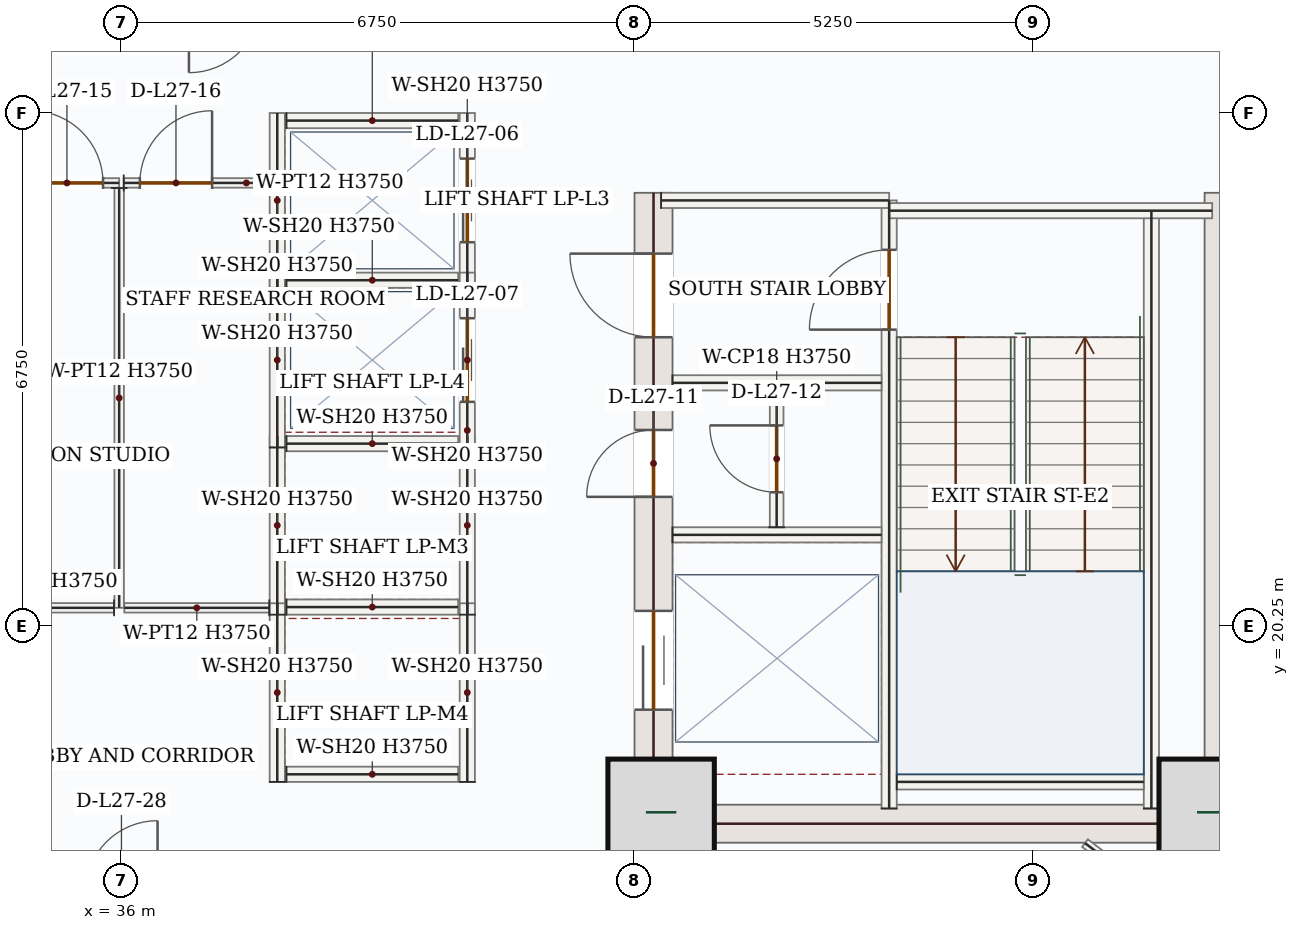
"""IFC4 building model, lengths in metres.
Left out: names, types, materials, properties, quantities, classifications, styles, units other than length and angle.
Written with IfcOpenShell. Run it as: python <this file> out.ifc"""

import sys

from ifc_helpers import new_model, si_unit, direction, frame, frame_2d, origin, origin_2d, place, context, subcontext, project, spatial, rectangle, extrude, source, transform, mapped, element, fill, save


model = new_model("IFC4")
c1 = context("Model", 3, precision=1e-05, world=origin(), true_north=direction((0.0, 1.0)))
c2 = subcontext(c1, "Body", "Model", "MODEL_VIEW")
j1 = project(units=[si_unit("LENGTHUNIT", "METRE"), si_unit("PLANEANGLEUNIT", "RADIAN")], contexts=[c1])
p1 = place(None, origin())
s1 = spatial("IfcSite", under=j1, at=p1, CompositionType="ELEMENT")
p2 = place(p1, origin())
s2 = spatial("IfcBuilding", under=s1, at=p2, CompositionType="ELEMENT")
p3 = place(p2, frame((0.0, 0.0, 121.5)))
s3 = spatial("IfcBuildingStorey", under=s2, at=p3, CompositionType="ELEMENT", Elevation=121.5)
p4 = place(p3, frame((43.0, 17.4, 0.0), z_axis=(0.0, 0.0, 1.0), x_axis=(0.0, 1.0, 0.0)))
e1 = element("IfcWall", 1, at=p4, inside=s3, PredefinedType="SHEAR", context=c2, shape_type="SweptSolid", body=[
    extrude(rectangle(XDim=8.55, YDim=0.5, at=frame_2d((4.275, 0.0))), origin(), (0.0, 0.0, 1.0), 3.75),
])
p5 = place(p4, frame((6.65, 0.0, 0.0)))
e2 = element("IfcOpeningElement", 2, at=p5, cuts=e1, PredefinedType="OPENING", context=c2, shape_type="SweptSolid", body=[
    extrude(rectangle(XDim=1.1, YDim=2.2, at=frame_2d((0.55, 1.1))), frame((0.0, 0.26, 0.0), z_axis=(0.0, -1.0, 0.0), x_axis=(1.0, 0.0, 0.0)), (0.0, 0.0, 1.0), 0.52),
])
p6 = place(p4, frame((1.75, 0.0, 0.0)))
e3 = element("IfcOpeningElement", 3, at=p6, cuts=e1, PredefinedType="OPENING", context=c2, shape_type="SweptSolid", body=[
    extrude(rectangle(XDim=1.3, YDim=2.2, at=frame_2d((0.65, 1.1))), frame((0.0, 0.26, 0.0), z_axis=(0.0, -1.0, 0.0), x_axis=(1.0, 0.0, 0.0)), (0.0, 0.0, 1.0), 0.52),
])
p7 = place(p4, frame((4.55, 0.0, 0.0)))
e4 = element("IfcOpeningElement", 4, at=p7, cuts=e1, PredefinedType="OPENING", context=c2, shape_type="SweptSolid", body=[
    extrude(rectangle(XDim=0.88, YDim=2.1, at=frame_2d((0.44, 1.05))), frame((0.0, 0.26, 0.0), z_axis=(0.0, -1.0, 0.0), x_axis=(1.0, 0.0, 0.0)), (0.0, 0.0, 1.0), 0.52),
])
m1 = source(origin(), c2, "Body", "SweptSolid", [
    extrude(rectangle(XDim=8.55, YDim=0.5, at=frame_2d((4.275, 0.0))), origin(), (0.0, 0.0, 1.0), 3.75),
])
p8 = place(p3, frame((50.5, 17.4, 0.0), z_axis=(0.0, 0.0, 1.0), x_axis=(0.0, 1.0, 0.0)))
e5 = element("IfcWall", 5, at=p8, inside=s3, PredefinedType="SHEAR", context=c2, shape_type="MappedRepresentation", body=[
    mapped(m1, transform((0.0, 0.0, 0.0), x_axis=(1.0, 0.0, 0.0), y_axis=(0.0, 1.0, 0.0), z_axis=(0.0, 0.0, 1.0), scale=1.0)),
])
m2 = source(origin(), c2, "Body", "SweptSolid", [
    extrude(rectangle(XDim=7.0, YDim=0.5, at=frame_2d((3.5, 0.0))), origin(), (0.0, 0.0, 1.0), 3.75),
])
p9 = place(p3, frame((43.25, 17.65, 0.0), z_axis=(0.0, 0.0, 1.0), x_axis=(1.0, 0.0, 0.0)))
e6 = element("IfcWall", 6, at=p9, inside=s3, PredefinedType="SHEAR", context=c2, shape_type="MappedRepresentation", body=[
    mapped(m2, transform((0.0, 0.0, 0.0), x_axis=(1.0, 0.0, 0.0), y_axis=(0.0, 1.0, 0.0), z_axis=(0.0, 0.0, 1.0), scale=1.0)),
])
m3 = source(origin(), c2, "Body", "SweptSolid", [
    extrude(rectangle(XDim=1.4, YDim=1.4, at=origin_2d()), origin(), (0.0, 0.0, 1.0), 4.2),
])
for number, where, z_axis, x_axis in (
    (7, (43.1, 17.8, 0.0), (0.0, 0.0, 1.0), (1.0, 0.0, 0.0)),
    (8, (50.35, 17.8, 0.0), (0.0, 0.0, 1.0), (1.0, 0.0, 0.0)),
):
    element("IfcColumn", number, at=place(p3, frame(where, z_axis=z_axis, x_axis=x_axis)), inside=s3, PredefinedType="COLUMN", context=c2, shape_type="MappedRepresentation", body=[
        mapped(m3, transform((0.0, 0.0, 0.0), x_axis=(1.0, 0.0, 0.0), y_axis=(0.0, 1.0, 0.0), z_axis=(0.0, 0.0, 1.0), scale=1.0)),
    ])
m4 = source(origin(), c2, "Body", "SweptSolid", [
    extrude(rectangle(XDim=5.258, YDim=0.32, at=frame_2d((2.629, 0.0))), origin(), (0.0, 0.0, 1.0), 3.75),
])
p10 = place(p3, frame((53.06, 18.458, 0.0), z_axis=(0.0, 0.0, 1.0), x_axis=(-0.707106781187, -0.707106781187, 0.0)))
e9 = element("IfcWall", 9, at=p10, inside=s3, PredefinedType="SOLIDWALL", context=c2, shape_type="MappedRepresentation", body=[
    mapped(m4, transform((0.0, 0.0, 0.0), x_axis=(1.0, 0.0, 0.0), y_axis=(0.0, 1.0, 0.0), z_axis=(0.0, 0.0, 1.0), scale=1.0)),
])
m5 = source(origin(), c2, "Body", "SweptSolid", [
    extrude(rectangle(XDim=7.87, YDim=0.2, at=frame_2d((3.935, 0.0))), origin(), (0.0, 0.0, 1.0), 3.75),
])
p11 = place(p3, frame((49.55, 17.85, 0.0), z_axis=(0.0, 0.0, 1.0), x_axis=(0.0, 1.0, 0.0)))
e10 = element("IfcWall", 10, at=p11, inside=s3, PredefinedType="SOLIDWALL", context=c2, shape_type="MappedRepresentation", body=[
    mapped(m5, transform((0.0, 0.0, 0.0), x_axis=(1.0, 0.0, 0.0), y_axis=(0.0, 1.0, 0.0), z_axis=(0.0, 0.0, 1.0), scale=1.0)),
])
p12 = place(p3, frame((46.1, 17.85, 0.0), z_axis=(0.0, 0.0, 1.0), x_axis=(0.0, 1.0, 0.0)))
e11 = element("IfcWall", 11, at=p12, inside=s3, PredefinedType="SOLIDWALL", context=c2, shape_type="SweptSolid", body=[
    extrude(rectangle(XDim=8.0, YDim=0.2, at=frame_2d((4.0, 0.0))), origin(), (0.0, 0.0, 1.0), 3.75),
])
p13 = place(p12, frame((6.3, 0.0, 0.0)))
e12 = element("IfcOpeningElement", 12, at=p13, cuts=e11, PredefinedType="OPENING", context=c2, shape_type="SweptSolid", body=[
    extrude(rectangle(XDim=1.05, YDim=2.15, at=frame_2d((0.525, 1.075))), frame((0.0, 0.11, 0.0), z_axis=(0.0, -1.0, 0.0), x_axis=(1.0, 0.0, 0.0)), (0.0, 0.0, 1.0), 0.22),
])
m6 = source(origin(), c2, "Body", "SweptSolid", [
    extrude(rectangle(XDim=3.0, YDim=0.2, at=frame_2d((1.5, 0.0))), origin(), (0.0, 0.0, 1.0), 3.75),
])
p14 = place(p3, frame((43.1, 25.85, 0.0), z_axis=(0.0, 0.0, 1.0), x_axis=(1.0, 0.0, 0.0)))
e13 = element("IfcWall", 13, at=p14, inside=s3, PredefinedType="SOLIDWALL", context=c2, shape_type="MappedRepresentation", body=[
    mapped(m6, transform((0.0, 0.0, 0.0), x_axis=(1.0, 0.0, 0.0), y_axis=(0.0, 1.0, 0.0), z_axis=(0.0, 0.0, 1.0), scale=1.0)),
])
m7 = source(origin(), c2, "Body", "SweptSolid", [
    extrude(rectangle(XDim=4.25, YDim=0.2, at=frame_2d((2.125, 0.0))), origin(), (0.0, 0.0, 1.0), 3.75),
])
p15 = place(p3, frame((46.1, 25.715, 0.0), z_axis=(0.0, 0.0, 1.0), x_axis=(1.0, 0.0, 0.0)))
e14 = element("IfcWall", 14, at=p15, inside=s3, PredefinedType="SOLIDWALL", context=c2, shape_type="MappedRepresentation", body=[
    mapped(m7, transform((0.0, 0.0, 0.0), x_axis=(1.0, 0.0, 0.0), y_axis=(0.0, 1.0, 0.0), z_axis=(0.0, 0.0, 1.0), scale=1.0)),
])
m8 = source(origin(), c2, "Body", "SweptSolid", [
    extrude(rectangle(XDim=3.25, YDim=0.2, at=frame_2d((1.625, 0.0))), origin(), (0.0, 0.0, 1.0), 3.75),
])
p16 = place(p3, frame((46.2, 18.2, 0.0), z_axis=(0.0, 0.0, 1.0), x_axis=(1.0, 0.0, 0.0)))
e15 = element("IfcWall", 15, at=p16, inside=s3, PredefinedType="SOLIDWALL", context=c2, shape_type="MappedRepresentation", body=[
    mapped(m8, transform((0.0, 0.0, 0.0), x_axis=(1.0, 0.0, 0.0), y_axis=(0.0, 1.0, 0.0), z_axis=(0.0, 0.0, 1.0), scale=1.0)),
])
m9 = source(origin(), c2, "Body", "SweptSolid", [
    extrude(rectangle(XDim=2.75, YDim=0.2, at=frame_2d((1.375, 0.0))), origin(), (0.0, 0.0, 1.0), 3.75),
])
for number, where, z_axis, x_axis in (
    (16, (43.25, 23.45, 0.0), (0.0, 0.0, 1.0), (1.0, 0.0, 0.0)),
    (17, (43.25, 21.45, 0.0), (0.0, 0.0, 1.0), (1.0, 0.0, 0.0)),
):
    element("IfcWall", number, at=place(p3, frame(where, z_axis=z_axis, x_axis=x_axis)), inside=s3, PredefinedType="SOLIDWALL", context=c2, shape_type="MappedRepresentation", body=[
        mapped(m9, transform((0.0, 0.0, 0.0), x_axis=(1.0, 0.0, 0.0), y_axis=(0.0, 1.0, 0.0), z_axis=(0.0, 0.0, 1.0), scale=1.0)),
    ])
p17 = place(p3, frame((44.62, 21.55, 0.0), z_axis=(0.0, 0.0, 1.0), x_axis=(0.0, 1.0, 0.0)))
e18 = element("IfcWall", 18, at=p17, inside=s3, PredefinedType="PARTITIONING", context=c2, shape_type="SweptSolid", body=[
    extrude(rectangle(XDim=1.8, YDim=0.18, at=frame_2d((0.9, 0.0))), origin(), (0.0, 0.0, 1.0), 3.75),
])
p18 = place(p17, frame((0.46, 0.0, 0.0)))
e19 = element("IfcOpeningElement", 19, at=p18, cuts=e18, PredefinedType="OPENING", context=c2, shape_type="SweptSolid", body=[
    extrude(rectangle(XDim=0.88, YDim=2.1, at=frame_2d((0.44, 1.05))), frame((0.0, 0.1, 0.0), z_axis=(0.0, -1.0, 0.0), x_axis=(1.0, 0.0, 0.0)), (0.0, 0.0, 1.0), 0.2),
])
m10 = source(origin(), c2, "Body", "SweptSolid", [
    extrude(rectangle(XDim=2.35, YDim=0.2, at=frame_2d((1.175, 0.0))), origin(), (0.0, 0.0, 1.0), 3.75),
])
for number, where, z_axis, x_axis in (
    (20, (38.05, 20.4, 0.0), (0.0, 0.0, 1.0), (0.0, 1.0, 0.0)),
    (21, (40.55, 20.4, 0.0), (0.0, 0.0, 1.0), (0.0, 1.0, 0.0)),
):
    element("IfcWall", number, at=place(p3, frame(where, z_axis=z_axis, x_axis=x_axis)), inside=s3, PredefinedType="SOLIDWALL", context=c2, shape_type="MappedRepresentation", body=[
        mapped(m10, transform((0.0, 0.0, 0.0), x_axis=(1.0, 0.0, 0.0), y_axis=(0.0, 1.0, 0.0), z_axis=(0.0, 0.0, 1.0), scale=1.0)),
    ])
m11 = source(origin(), c2, "Body", "SweptSolid", [
    extrude(rectangle(XDim=2.26, YDim=0.2, at=frame_2d((1.13, 0.0))), origin(), (0.0, 0.0, 1.0), 3.75),
])
for number, where, z_axis, x_axis in (
    (22, (38.17, 20.5, 0.0), (0.0, 0.0, 1.0), (1.0, 0.0, 0.0)),
    (23, (38.17, 22.65, 0.0), (0.0, 0.0, 1.0), (1.0, 0.0, 0.0)),
):
    element("IfcWall", number, at=place(p3, frame(where, z_axis=z_axis, x_axis=x_axis)), inside=s3, PredefinedType="SOLIDWALL", context=c2, shape_type="MappedRepresentation", body=[
        mapped(m11, transform((0.0, 0.0, 0.0), x_axis=(1.0, 0.0, 0.0), y_axis=(0.0, 1.0, 0.0), z_axis=(0.0, 0.0, 1.0), scale=1.0)),
    ])
for number, where, z_axis, x_axis in (
    (24, (38.05, 18.2, 0.0), (0.0, 0.0, 1.0), (0.0, 1.0, 0.0)),
    (25, (40.55, 18.2, 0.0), (0.0, 0.0, 1.0), (0.0, 1.0, 0.0)),
):
    element("IfcWall", number, at=place(p3, frame(where, z_axis=z_axis, x_axis=x_axis)), inside=s3, PredefinedType="SOLIDWALL", context=c2, shape_type="MappedRepresentation", body=[
        mapped(m10, transform((0.0, 0.0, 0.0), x_axis=(1.0, 0.0, 0.0), y_axis=(0.0, 1.0, 0.0), z_axis=(0.0, 0.0, 1.0), scale=1.0)),
    ])
p19 = place(p3, frame((38.17, 18.3, 0.0), z_axis=(0.0, 0.0, 1.0), x_axis=(1.0, 0.0, 0.0)))
e26 = element("IfcWall", 26, at=p19, inside=s3, PredefinedType="SOLIDWALL", context=c2, shape_type="MappedRepresentation", body=[
    mapped(m11, transform((0.0, 0.0, 0.0), x_axis=(1.0, 0.0, 0.0), y_axis=(0.0, 1.0, 0.0), z_axis=(0.0, 0.0, 1.0), scale=1.0)),
])
m12 = source(origin(), c2, "Body", "SweptSolid", [
    extrude(rectangle(XDim=2.3, YDim=0.2, at=frame_2d((1.15, 0.0))), origin(), (0.0, 0.0, 1.0), 3.75),
])
p20 = place(p3, frame((38.05, 24.7, 0.0), z_axis=(0.0, 0.0, 1.0), x_axis=(0.0, 1.0, 0.0)))
e27 = element("IfcWall", 27, at=p20, inside=s3, PredefinedType="SOLIDWALL", context=c2, shape_type="MappedRepresentation", body=[
    mapped(m12, transform((0.0, 0.0, 0.0), x_axis=(1.0, 0.0, 0.0), y_axis=(0.0, 1.0, 0.0), z_axis=(0.0, 0.0, 1.0), scale=1.0)),
])
p21 = place(p3, frame((40.55, 24.7, 0.0), z_axis=(0.0, 0.0, 1.0), x_axis=(0.0, 1.0, 0.0)))
e28 = element("IfcWall", 28, at=p21, inside=s3, PredefinedType="SOLIDWALL", context=c2, shape_type="SweptSolid", body=[
    extrude(rectangle(XDim=2.3, YDim=0.2, at=frame_2d((1.15, 0.0))), origin(), (0.0, 0.0, 1.0), 3.75),
])
p22 = place(p21, frame((0.6, 0.0, 0.0)))
e29 = element("IfcOpeningElement", 29, at=p22, cuts=e28, PredefinedType="OPENING", context=c2, shape_type="SweptSolid", body=[
    extrude(rectangle(XDim=1.1, YDim=2.15, at=frame_2d((0.55, 1.075))), frame((0.0, 0.11, 0.0), z_axis=(0.0, -1.0, 0.0), x_axis=(1.0, 0.0, 0.0)), (0.0, 0.0, 1.0), 0.22),
])
for number, where, z_axis, x_axis in (
    (30, (38.17, 24.8, 0.0), (0.0, 0.0, 1.0), (1.0, 0.0, 0.0)),
    (31, (38.17, 26.9, 0.0), (0.0, 0.0, 1.0), (1.0, 0.0, 0.0)),
):
    element("IfcWall", number, at=place(p3, frame(where, z_axis=z_axis, x_axis=x_axis)), inside=s3, PredefinedType="SOLIDWALL", context=c2, shape_type="MappedRepresentation", body=[
        mapped(m11, transform((0.0, 0.0, 0.0), x_axis=(1.0, 0.0, 0.0), y_axis=(0.0, 1.0, 0.0), z_axis=(0.0, 0.0, 1.0), scale=1.0)),
    ])
m13 = source(origin(), c2, "Body", "SweptSolid", [
    extrude(rectangle(XDim=2.3, YDim=0.2, at=frame_2d((1.15, 0.0))), origin(), (0.0, 0.0, 1.0), 3.75),
])
p23 = place(p3, frame((38.05, 22.6, 0.0), z_axis=(0.0, 0.0, 1.0), x_axis=(0.0, 1.0, 0.0)))
e32 = element("IfcWall", 32, at=p23, inside=s3, PredefinedType="SOLIDWALL", context=c2, shape_type="MappedRepresentation", body=[
    mapped(m13, transform((0.0, 0.0, 0.0), x_axis=(1.0, 0.0, 0.0), y_axis=(0.0, 1.0, 0.0), z_axis=(0.0, 0.0, 1.0), scale=1.0)),
])
p24 = place(p3, frame((40.55, 22.6, 0.0), z_axis=(0.0, 0.0, 1.0), x_axis=(0.0, 1.0, 0.0)))
e33 = element("IfcWall", 33, at=p24, inside=s3, PredefinedType="SOLIDWALL", context=c2, shape_type="SweptSolid", body=[
    extrude(rectangle(XDim=2.3, YDim=0.2, at=frame_2d((1.15, 0.0))), origin(), (0.0, 0.0, 1.0), 3.75),
])
p25 = place(p24, frame((0.6, 0.0, 0.0)))
e34 = element("IfcOpeningElement", 34, at=p25, cuts=e33, PredefinedType="OPENING", context=c2, shape_type="SweptSolid", body=[
    extrude(rectangle(XDim=1.1, YDim=2.15, at=frame_2d((0.55, 1.075))), frame((0.0, 0.11, 0.0), z_axis=(0.0, -1.0, 0.0), x_axis=(1.0, 0.0, 0.0)), (0.0, 0.0, 1.0), 0.22),
])
p26 = place(p3, frame((34.055, 26.08, 0.0), z_axis=(0.0, 0.0, 1.0), x_axis=(1.0, 0.0, 0.0)))
e35 = element("IfcWall", 35, at=p26, inside=s3, PredefinedType="PARTITIONING", context=c2, shape_type="SweptSolid", body=[
    extrude(rectangle(XDim=1.915, YDim=0.125, at=frame_2d((0.958, 0.0))), origin(), (0.0, 0.0, 1.0), 3.75),
])
p27 = place(p26, frame((0.753, 0.0, 0.0)))
e36 = element("IfcOpeningElement", 36, at=p27, cuts=e35, PredefinedType="OPENING", context=c2, shape_type="SweptSolid", body=[
    extrude(rectangle(XDim=0.95, YDim=2.15, at=frame_2d((0.475, 1.075))), frame((0.0, 0.073, 0.0), z_axis=(0.0, -1.0, 0.0), x_axis=(1.0, 0.0, 0.0)), (0.0, 0.0, 1.0), 0.145),
])
m14 = source(origin(), c2, "Body", "SweptSolid", [
    extrude(rectangle(XDim=5.522, YDim=0.125, at=frame_2d((2.761, 0.0))), origin(), (0.0, 0.0, 1.0), 3.75),
])
p28 = place(p3, frame((35.97, 26.012, 0.0), z_axis=(0.0, 0.0, 1.0), x_axis=(0.0, -1.0, 0.0)))
e37 = element("IfcWall", 37, at=p28, inside=s3, PredefinedType="PARTITIONING", context=c2, shape_type="MappedRepresentation", body=[
    mapped(m14, transform((0.0, 0.0, 0.0), x_axis=(1.0, 0.0, 0.0), y_axis=(0.0, 1.0, 0.0), z_axis=(0.0, 0.0, 1.0), scale=1.0)),
])
m15 = source(origin(), c2, "Body", "SweptSolid", [
    extrude(rectangle(XDim=1.848, YDim=0.125, at=frame_2d((0.924, 0.0))), origin(), (0.0, 0.0, 1.0), 3.75),
])
p29 = place(p3, frame((35.903, 20.49, 0.0), z_axis=(0.0, 0.0, 1.0), x_axis=(-1.0, 0.0, 0.0)))
e38 = element("IfcWall", 38, at=p29, inside=s3, PredefinedType="PARTITIONING", context=c2, shape_type="MappedRepresentation", body=[
    mapped(m15, transform((0.0, 0.0, 0.0), x_axis=(1.0, 0.0, 0.0), y_axis=(0.0, 1.0, 0.0), z_axis=(0.0, 0.0, 1.0), scale=1.0)),
])
p30 = place(p3, frame((36.03, 26.08, 0.0), z_axis=(0.0, 0.0, 1.0), x_axis=(1.0, 0.0, 0.0)))
e39 = element("IfcWall", 39, at=p30, inside=s3, PredefinedType="PARTITIONING", context=c2, shape_type="SweptSolid", body=[
    extrude(rectangle(XDim=1.915, YDim=0.125, at=frame_2d((0.958, 0.0))), origin(), (0.0, 0.0, 1.0), 3.75),
])
p31 = place(p30, frame((0.212, 0.0, 0.0)))
e40 = element("IfcOpeningElement", 40, at=p31, cuts=e39, PredefinedType="OPENING", context=c2, shape_type="SweptSolid", body=[
    extrude(rectangle(XDim=0.95, YDim=2.15, at=frame_2d((0.475, 1.075))), frame((0.0, 0.073, 0.0), z_axis=(0.0, -1.0, 0.0), x_axis=(1.0, 0.0, 0.0)), (0.0, 0.0, 1.0), 0.145),
])
m16 = source(origin(), c2, "Body", "SweptSolid", [
    extrude(rectangle(XDim=1.907, YDim=0.125, at=frame_2d((0.954, 0.0))), origin(), (0.0, 0.0, 1.0), 3.75),
])
p32 = place(p3, frame((37.945, 20.49, 0.0), z_axis=(0.0, 0.0, 1.0), x_axis=(-1.0, 0.0, 0.0)))
e41 = element("IfcWall", 41, at=p32, inside=s3, PredefinedType="PARTITIONING", context=c2, shape_type="MappedRepresentation", body=[
    mapped(m16, transform((0.0, 0.0, 0.0), x_axis=(1.0, 0.0, 0.0), y_axis=(0.0, 1.0, 0.0), z_axis=(0.0, 0.0, 1.0), scale=1.0)),
])
m17 = source(origin(), c2, "Body", "SweptSolid", [
    extrude(rectangle(XDim=2.203, YDim=0.125, at=frame_2d((1.102, 0.0))), origin(), (0.0, 0.0, 1.0), 3.75),
])
p33 = place(p3, frame((50.429, 16.061, 0.0), z_axis=(0.0, 0.0, 1.0), x_axis=(-0.795630117323, 0.605782730365, 0.0)))
e42 = element("IfcWall", 42, at=p33, inside=s3, PredefinedType="PARTITIONING", context=c2, shape_type="MappedRepresentation", body=[
    mapped(m17, transform((0.0, 0.0, 0.0), x_axis=(1.0, 0.0, 0.0), y_axis=(0.0, 1.0, 0.0), z_axis=(0.0, 0.0, 1.0), scale=1.0)),
])
m18 = source(origin(), c2, "Body", "SweptSolid", [
    extrude(rectangle(XDim=1.05, YDim=2.15, at=frame_2d((0.525, 1.075))), frame((0.0, 0.025, 0.0), z_axis=(0.0, -1.0, 0.0), x_axis=(1.0, 0.0, 0.0)), (0.0, 0.0, 1.0), 0.05),
])
p34 = place(p13, origin())
e43 = element("IfcDoor", 43, at=p34, inside=s3, OperationType="SINGLE_SWING_LEFT", PredefinedType="DOOR", context=c2, shape_type="MappedRepresentation", body=[
    mapped(m18, transform((0.0, 0.0, 0.0), x_axis=(1.0, 0.0, 0.0), y_axis=(0.0, 1.0, 0.0), z_axis=(0.0, 0.0, 1.0), scale=1.0)),
])
fill(e12, e43)
m19 = source(origin(), c2, "Body", "SweptSolid", [
    extrude(rectangle(XDim=1.1, YDim=2.2, at=frame_2d((0.55, 1.1))), frame((0.0, 0.025, 0.0), z_axis=(0.0, -1.0, 0.0), x_axis=(1.0, 0.0, 0.0)), (0.0, 0.0, 1.0), 0.05),
])
p35 = place(p5, origin())
e44 = element("IfcDoor", 44, at=p35, inside=s3, OperationType="SINGLE_SWING_RIGHT", PredefinedType="DOOR", context=c2, shape_type="MappedRepresentation", body=[
    mapped(m19, transform((0.0, 0.0, 0.0), x_axis=(1.0, 0.0, 0.0), y_axis=(0.0, 1.0, 0.0), z_axis=(0.0, 0.0, 1.0), scale=1.0)),
])
fill(e2, e44)
m20 = source(origin(), c2, "Body", "SweptSolid", [
    extrude(rectangle(XDim=1.3, YDim=2.2, at=frame_2d((0.65, 1.1))), frame((0.0, 0.025, 0.0), z_axis=(0.0, -1.0, 0.0), x_axis=(1.0, 0.0, 0.0)), (0.0, 0.0, 1.0), 0.05),
])
p36 = place(p6, origin())
e45 = element("IfcDoor", 45, at=p36, inside=s3, OperationType="DOUBLE_DOOR_SLIDING", PredefinedType="DOOR", context=c2, shape_type="MappedRepresentation", body=[
    mapped(m20, transform((0.0, 0.0, 0.0), x_axis=(1.0, 0.0, 0.0), y_axis=(0.0, 1.0, 0.0), z_axis=(0.0, 0.0, 1.0), scale=1.0)),
])
fill(e3, e45)
m21 = source(origin(), c2, "Body", "SweptSolid", [
    extrude(rectangle(XDim=0.88, YDim=2.1, at=frame_2d((0.44, 1.05))), frame((0.0, 0.025, 0.0), z_axis=(0.0, -1.0, 0.0), x_axis=(1.0, 0.0, 0.0)), (0.0, 0.0, 1.0), 0.05),
])
p37 = place(p7, origin())
e46 = element("IfcDoor", 46, at=p37, inside=s3, OperationType="SINGLE_SWING_LEFT", PredefinedType="DOOR", context=c2, shape_type="MappedRepresentation", body=[
    mapped(m21, transform((0.0, 0.0, 0.0), x_axis=(1.0, 0.0, 0.0), y_axis=(0.0, 1.0, 0.0), z_axis=(0.0, 0.0, 1.0), scale=1.0)),
])
fill(e4, e46)
p38 = place(p18, origin())
e47 = element("IfcDoor", 47, at=p38, inside=s3, OperationType="SINGLE_SWING_RIGHT", PredefinedType="DOOR", context=c2, shape_type="MappedRepresentation", body=[
    mapped(m21, transform((0.0, 0.0, 0.0), x_axis=(1.0, 0.0, 0.0), y_axis=(0.0, 1.0, 0.0), z_axis=(0.0, 0.0, 1.0), scale=1.0)),
])
fill(e19, e47)
m22 = source(origin(), c2, "Body", "SweptSolid", [
    extrude(rectangle(XDim=1.1, YDim=2.15, at=frame_2d((0.55, 1.075))), frame((0.0, 0.025, 0.0), z_axis=(0.0, -1.0, 0.0), x_axis=(1.0, 0.0, 0.0)), (0.0, 0.0, 1.0), 0.05),
])
p39 = place(p22, origin())
e48 = element("IfcDoor", 48, at=p39, inside=s3, OperationType="DOUBLE_DOOR_SLIDING", PredefinedType="DOOR", context=c2, shape_type="MappedRepresentation", body=[
    mapped(m22, transform((0.0, 0.0, 0.0), x_axis=(1.0, 0.0, 0.0), y_axis=(0.0, 1.0, 0.0), z_axis=(0.0, 0.0, 1.0), scale=1.0)),
])
fill(e29, e48)
p40 = place(p25, origin())
e49 = element("IfcDoor", 49, at=p40, inside=s3, OperationType="DOUBLE_DOOR_SLIDING", PredefinedType="DOOR", context=c2, shape_type="MappedRepresentation", body=[
    mapped(m22, transform((0.0, 0.0, 0.0), x_axis=(1.0, 0.0, 0.0), y_axis=(0.0, 1.0, 0.0), z_axis=(0.0, 0.0, 1.0), scale=1.0)),
])
fill(e34, e49)
m23 = source(origin(), c2, "Body", "SweptSolid", [
    extrude(rectangle(XDim=0.95, YDim=2.15, at=frame_2d((0.475, 1.075))), frame((0.0, 0.025, 0.0), z_axis=(0.0, -1.0, 0.0), x_axis=(1.0, 0.0, 0.0)), (0.0, 0.0, 1.0), 0.05),
])
p41 = place(p27, origin())
e50 = element("IfcDoor", 50, at=p41, inside=s3, OperationType="SINGLE_SWING_LEFT", PredefinedType="DOOR", context=c2, shape_type="MappedRepresentation", body=[
    mapped(m23, transform((0.0, 0.0, 0.0), x_axis=(1.0, 0.0, 0.0), y_axis=(0.0, 1.0, 0.0), z_axis=(0.0, 0.0, 1.0), scale=1.0)),
])
fill(e36, e50)
p42 = place(p31, origin())
e51 = element("IfcDoor", 51, at=p42, inside=s3, OperationType="SINGLE_SWING_RIGHT", PredefinedType="DOOR", context=c2, shape_type="MappedRepresentation", body=[
    mapped(m23, transform((0.0, 0.0, 0.0), x_axis=(1.0, 0.0, 0.0), y_axis=(0.0, 1.0, 0.0), z_axis=(0.0, 0.0, 1.0), scale=1.0)),
])
fill(e40, e51)
save(model, sys.argv[1])
